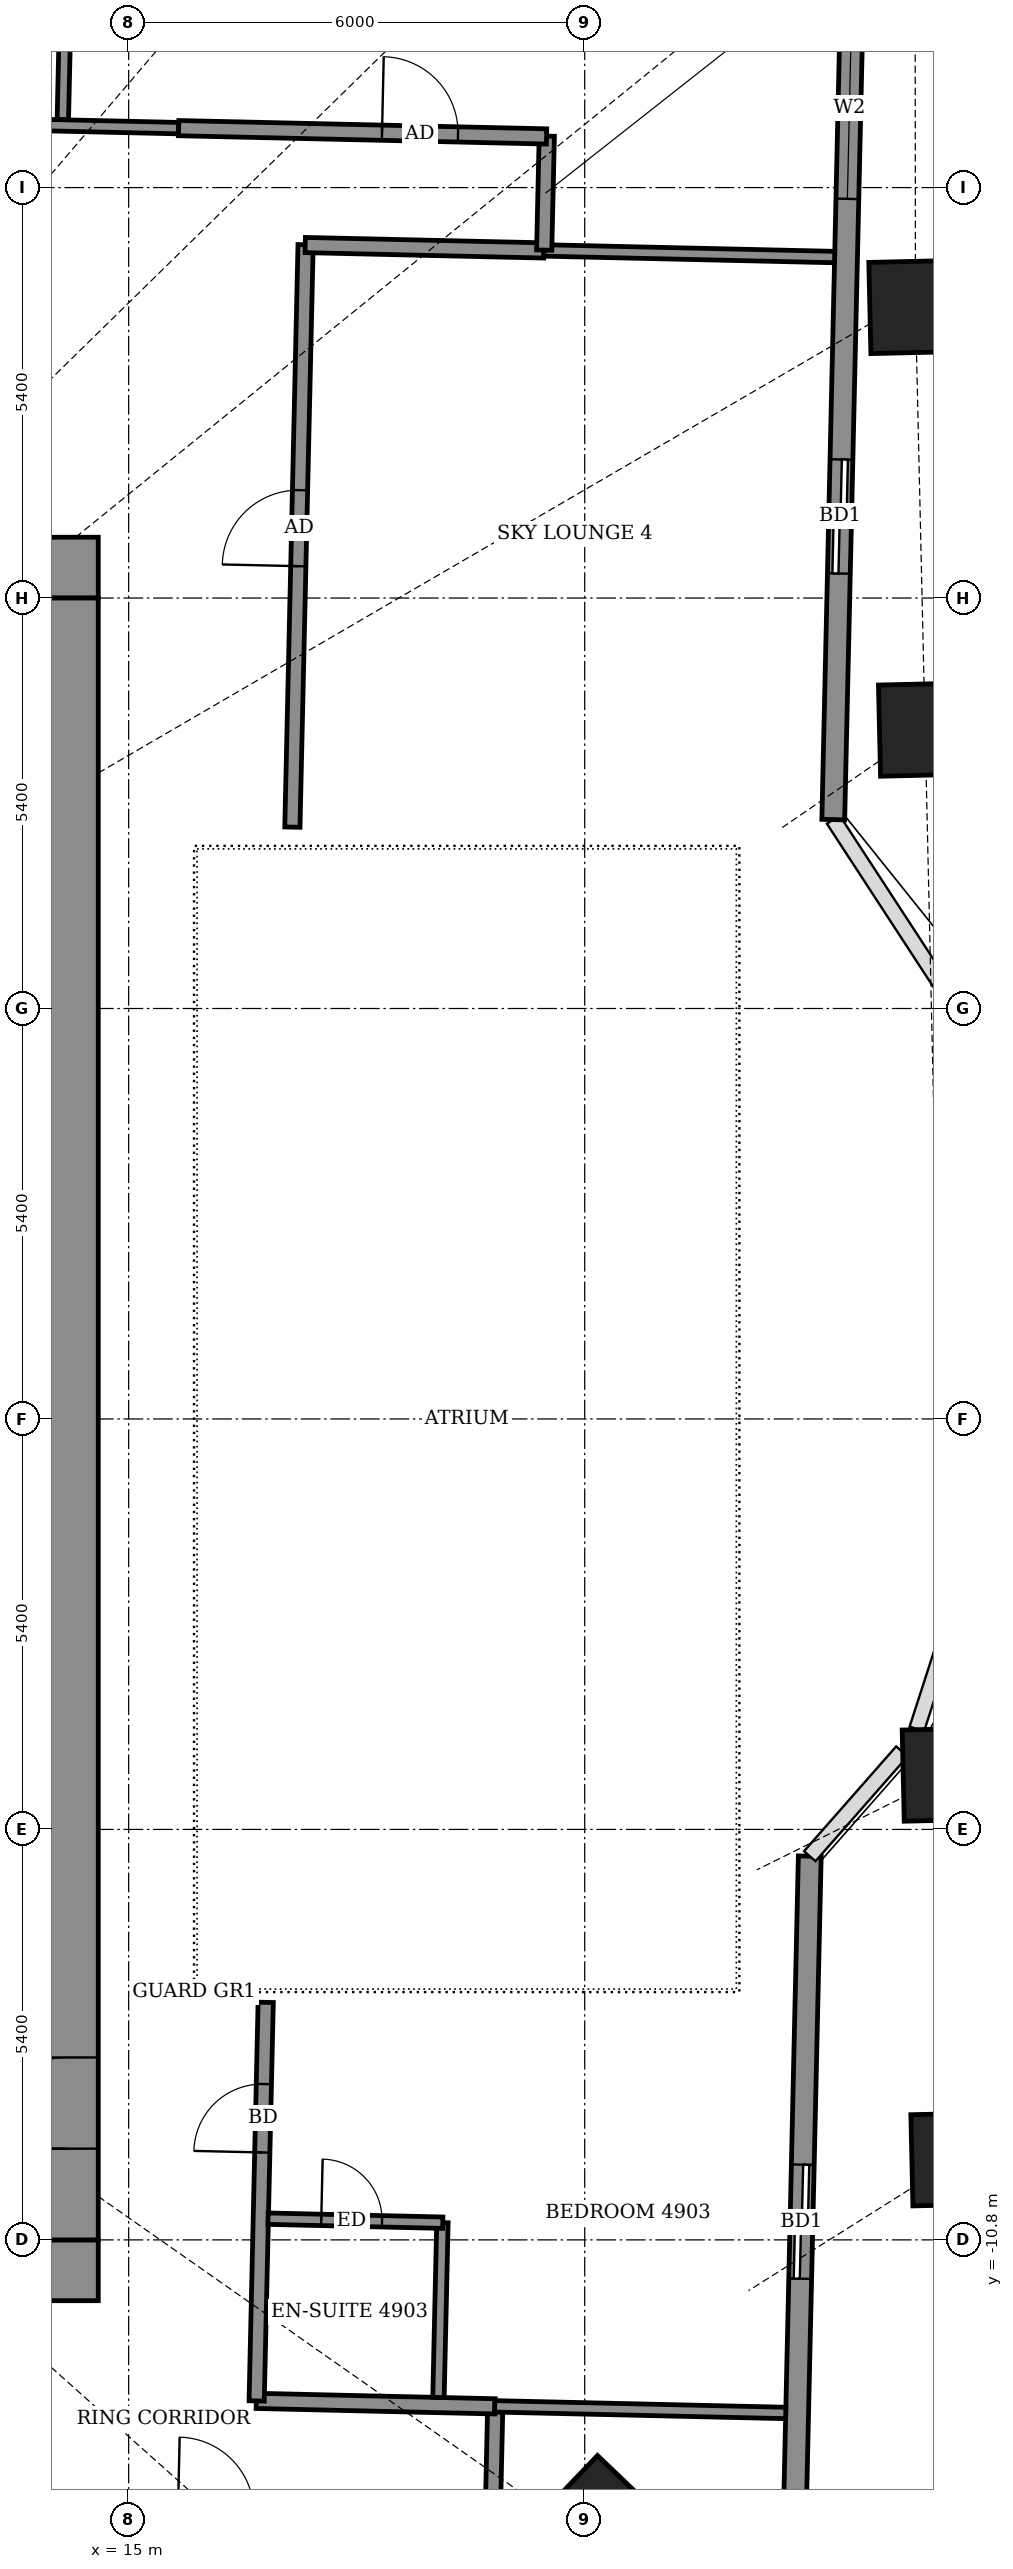
"""IFC4 building model, lengths in metres.
Left out: names, types, materials, properties, quantities, classifications, styles, units other than length and angle.
Written with IfcOpenShell. Run it as: python <this file> out.ifc"""

import sys

from ifc_helpers import new_model, si_unit, direction, frame, frame_2d, origin, origin_2d, place, context, subcontext, project, spatial, rectangle, extrude, element, fill, save


model = new_model("IFC4")
c1 = context("Model", 3, precision=1e-05, world=origin(), true_north=direction((0.0, 1.0)))
c2 = subcontext(c1, "Body", "Model", "MODEL_VIEW")
j1 = project(units=[si_unit("LENGTHUNIT", "METRE"), si_unit("PLANEANGLEUNIT", "RADIAN")], contexts=[c1])
p1 = place(None, origin())
s1 = spatial("IfcSite", under=j1, at=p1, CompositionType="ELEMENT")
p2 = place(p1, origin())
s2 = spatial("IfcBuilding", under=s1, at=p2, CompositionType="ELEMENT")
p3 = place(p2, frame((0.0, 0.0, 193.3)))
s3 = spatial("IfcBuildingStorey", under=s2, at=p3, CompositionType="ELEMENT", Elevation=193.3)
for number, where, z_axis, x_axis in (
    (1, (21.187, -14.486, -0.55), (0.0, 0.0, 1.0), (0.691, 0.723, 0.0)),
    (2, (26.183, -14.375, -0.55), (0.0, 0.0, 1.0), (0.686, 0.727, 0.0)),
    (3, (25.904, -9.74, -0.55), (0.0, 0.0, 1.0), (-0.023, 1.0, 0.0)),
    (4, (25.79, -4.678, -0.55), (0.0, 0.0, 1.0), (-0.023, 1.0, 0.0)),
    (5, (25.478, 9.069, -0.55), (0.0, 0.0, 1.0), (-0.023, 1.0, 0.0)),
    (6, (25.351, 14.629, -0.55), (0.0, 0.0, 1.0), (-0.023, 1.0, 0.0)),
):
    element("IfcColumn", number, at=place(p3, frame(where, z_axis=z_axis, x_axis=x_axis)), inside=s3, PredefinedType="COLUMN", context=c2, shape_type="SweptSolid", body=[
        extrude(rectangle(XDim=1.2, YDim=1.2, at=origin_2d()), origin(), (0.0, 0.0, 1.0), 4.6),
    ])
p4 = place(p3, frame((23.713, -16.679, 0.0), z_axis=(0.0, 0.0, 1.0), x_axis=(0.02269451316, 0.999742446369, 0.0)))
e7 = element("IfcWall", 7, at=p4, inside=s3, PredefinedType="SOLIDWALL", context=c2, shape_type="SweptSolid", body=[
    extrude(rectangle(XDim=10.93, YDim=0.3, at=frame_2d((5.465, 0.0))), origin(), (0.0, 0.0, 1.0), 2.65),
])
p5 = place(p4, frame((0.975, 0.0, 0.0)))
e8 = element("IfcOpeningElement", 8, at=p5, cuts=e7, PredefinedType="OPENING", context=c2, shape_type="SweptSolid", body=[
    extrude(rectangle(XDim=1.5, YDim=2.4, at=frame_2d((0.75, 1.2))), frame((0.0, 0.16, 0.0), z_axis=(0.0, -1.0, 0.0), x_axis=(1.0, 0.0, 0.0)), (0.0, 0.0, 1.0), 0.32),
])
p6 = place(p4, frame((5.37, 0.0, 0.0)))
e9 = element("IfcOpeningElement", 9, at=p6, cuts=e7, PredefinedType="OPENING", context=c2, shape_type="SweptSolid", body=[
    extrude(rectangle(XDim=1.5, YDim=2.4, at=frame_2d((0.75, 1.2))), frame((0.0, 0.16, 0.0), z_axis=(0.0, -1.0, 0.0), x_axis=(1.0, 0.0, 0.0)), (0.0, 0.0, 1.0), 0.32),
])
p7 = place(p3, frame((24.27, 7.885, 0.0), z_axis=(0.0, 0.0, 1.0), x_axis=(0.022715362207, 0.999741972871, 0.0)))
e10 = element("IfcWall", 10, at=p7, inside=s3, PredefinedType="SOLIDWALL", context=c2, shape_type="SweptSolid", body=[
    extrude(rectangle(XDim=11.93, YDim=0.3, at=frame_2d((5.965, 0.0))), origin(), (0.0, 0.0, 1.0), 2.65),
])
p8 = place(p7, frame((3.239, 0.0, 0.0)))
e11 = element("IfcOpeningElement", 11, at=p8, cuts=e10, PredefinedType="OPENING", context=c2, shape_type="SweptSolid", body=[
    extrude(rectangle(XDim=1.5, YDim=2.4, at=frame_2d((0.75, 1.2))), frame((0.0, 0.16, 0.0), z_axis=(0.0, -1.0, 0.0), x_axis=(1.0, 0.0, 0.0)), (0.0, 0.0, 1.0), 0.32),
])
p9 = place(p7, frame((8.169, 0.0, 0.9)))
e12 = element("IfcOpeningElement", 12, at=p9, cuts=e10, PredefinedType="OPENING", context=c2, shape_type="SweptSolid", body=[
    extrude(rectangle(XDim=2.4, YDim=1.5, at=frame_2d((1.2, 0.75))), frame((0.0, 0.16, 0.0), z_axis=(0.0, -1.0, 0.0), x_axis=(1.0, 0.0, 0.0)), (0.0, 0.0, 1.0), 0.32),
])
p10 = place(p3, frame((-17.718, -13.638, 0.0), z_axis=(0.0, 0.0, 1.0), x_axis=(0.999742614446, -0.022687107814, 0.0)))
e13 = element("IfcWall", 13, at=p10, inside=s3, PredefinedType="PARTITIONING", context=c2, shape_type="SweptSolid", body=[
    extrude(rectangle(XDim=37.514, YDim=0.2, at=frame_2d((18.757, 0.0))), origin(), (0.0, 0.0, 1.0), 2.85),
])
p11 = place(p10, frame((7.37, 0.0, 0.0)))
e14 = element("IfcOpeningElement", 14, at=p11, cuts=e13, PredefinedType="OPENING", context=c2, shape_type="SweptSolid", body=[
    extrude(rectangle(XDim=1.0, YDim=2.1, at=frame_2d((0.5, 1.05))), frame((0.0, 0.11, 0.0), z_axis=(0.0, -1.0, 0.0), x_axis=(1.0, 0.0, 0.0)), (0.0, 0.0, 1.0), 0.22),
])
p12 = place(p10, frame((3.295, 0.0, 0.0)))
e15 = element("IfcOpeningElement", 15, at=p12, cuts=e13, PredefinedType="OPENING", context=c2, shape_type="SweptSolid", body=[
    extrude(rectangle(XDim=0.9, YDim=2.1, at=frame_2d((0.45, 1.05))), frame((0.0, 0.11, 0.0), z_axis=(0.0, -1.0, 0.0), x_axis=(1.0, 0.0, 0.0)), (0.0, 0.0, 1.0), 0.22),
])
p13 = place(p10, frame((11.645, 0.0, 0.0)))
e16 = element("IfcOpeningElement", 16, at=p13, cuts=e13, PredefinedType="OPENING", context=c2, shape_type="SweptSolid", body=[
    extrude(rectangle(XDim=0.9, YDim=2.1, at=frame_2d((0.45, 1.05))), frame((0.0, 0.11, 0.0), z_axis=(0.0, -1.0, 0.0), x_axis=(1.0, 0.0, 0.0)), (0.0, 0.0, 1.0), 0.22),
])
p14 = place(p10, frame((19.02, 0.0, 0.0)))
e17 = element("IfcOpeningElement", 17, at=p14, cuts=e13, PredefinedType="OPENING", context=c2, shape_type="SweptSolid", body=[
    extrude(rectangle(XDim=0.9, YDim=2.1, at=frame_2d((0.45, 1.05))), frame((0.0, 0.11, 0.0), z_axis=(0.0, -1.0, 0.0), x_axis=(1.0, 0.0, 0.0)), (0.0, 0.0, 1.0), 0.22),
])
p15 = place(p10, frame((22.67, 0.0, 0.0)))
e18 = element("IfcOpeningElement", 18, at=p15, cuts=e13, PredefinedType="OPENING", context=c2, shape_type="SweptSolid", body=[
    extrude(rectangle(XDim=1.0, YDim=2.1, at=frame_2d((0.5, 1.05))), frame((0.0, 0.11, 0.0), z_axis=(0.0, -1.0, 0.0), x_axis=(1.0, 0.0, 0.0)), (0.0, 0.0, 1.0), 0.22),
])
p16 = place(p10, frame((26.445, 0.0, 0.0)))
e19 = element("IfcOpeningElement", 19, at=p16, cuts=e13, PredefinedType="OPENING", context=c2, shape_type="SweptSolid", body=[
    extrude(rectangle(XDim=0.9, YDim=2.1, at=frame_2d((0.45, 1.05))), frame((0.0, 0.11, 0.0), z_axis=(0.0, -1.0, 0.0), x_axis=(1.0, 0.0, 0.0)), (0.0, 0.0, 1.0), 0.22),
])
p17 = place(p10, frame((33.375, 0.0, 0.0)))
e20 = element("IfcOpeningElement", 20, at=p17, cuts=e13, PredefinedType="OPENING", context=c2, shape_type="SweptSolid", body=[
    extrude(rectangle(XDim=1.0, YDim=2.1, at=frame_2d((0.5, 1.05))), frame((0.0, 0.11, 0.0), z_axis=(0.0, -1.0, 0.0), x_axis=(1.0, 0.0, 0.0)), (0.0, 0.0, 1.0), 0.22),
])
p18 = place(p3, frame((19.789, -14.489, 0.0), z_axis=(0.0, 0.0, 1.0), x_axis=(0.022632637625, 0.99974384905, 0.0)))
e21 = element("IfcWall", 21, at=p18, inside=s3, PredefinedType="PARTITIONING", context=c2, shape_type="SweptSolid", body=[
    extrude(rectangle(XDim=1.5, YDim=0.2, at=frame_2d((0.75, 0.0))), origin(), (0.0, 0.0, 1.0), 2.85),
])
p19 = place(p3, frame((16.679, -12.918, 0.0), z_axis=(0.0, 0.0, 1.0), x_axis=(0.999737242123, -0.02292262447, 0.0)))
e22 = element("IfcWall", 22, at=p19, inside=s3, PredefinedType="PARTITIONING", context=c2, shape_type="SweptSolid", body=[
    extrude(rectangle(XDim=3.142, YDim=0.2, at=frame_2d((1.571, 0.0))), origin(), (0.0, 0.0, 1.0), 2.85),
])
p20 = place(p3, frame((16.684, -12.919, 0.0), z_axis=(0.0, 0.0, 1.0), x_axis=(0.022667483124, 0.999743059595, 0.0)))
e23 = element("IfcWall", 23, at=p20, inside=s3, PredefinedType="PARTITIONING", context=c2, shape_type="SweptSolid", body=[
    extrude(rectangle(XDim=5.245, YDim=0.2, at=frame_2d((2.623, 0.0))), origin(), (0.0, 0.0, 1.0), 2.85),
])
p21 = place(p20, frame((3.27, 0.0, 0.0)))
e24 = element("IfcOpeningElement", 24, at=p21, cuts=e23, PredefinedType="OPENING", context=c2, shape_type="SweptSolid", body=[
    extrude(rectangle(XDim=0.9, YDim=2.1, at=frame_2d((0.45, 1.05))), frame((0.0, 0.11, 0.0), z_axis=(0.0, -1.0, 0.0), x_axis=(1.0, 0.0, 0.0)), (0.0, 0.0, 1.0), 0.22),
])
p22 = place(p3, frame((19.076, -12.873, 0.0), z_axis=(0.0, 0.0, 1.0), x_axis=(0.022603288534, 0.999744513037, 0.0)))
e25 = element("IfcWall", 25, at=p22, inside=s3, PredefinedType="PARTITIONING", context=c2, shape_type="SweptSolid", body=[
    extrude(rectangle(XDim=2.301, YDim=0.15, at=frame_2d((1.15, 0.0))), origin(), (0.0, 0.0, 1.0), 2.85),
])
p23 = place(p3, frame((19.816, -12.99, 0.0), z_axis=(0.0, 0.0, 1.0), x_axis=(0.999742493286, -0.02269244629, 0.0)))
e26 = element("IfcWall", 26, at=p23, inside=s3, PredefinedType="PARTITIONING", context=c2, shape_type="SweptSolid", body=[
    extrude(rectangle(XDim=3.83, YDim=0.15, at=frame_2d((1.915, 0.0))), origin(), (0.0, 0.0, 1.0), 2.85),
])
p24 = place(p3, frame((16.834, -10.521, 0.0), z_axis=(0.0, 0.0, 1.0), x_axis=(0.999734605807, -0.023037316498, 0.0)))
e27 = element("IfcWall", 27, at=p24, inside=s3, PredefinedType="PARTITIONING", context=c2, shape_type="SweptSolid", body=[
    extrude(rectangle(XDim=2.3, YDim=0.15, at=frame_2d((1.15, 0.0))), origin(), (0.0, 0.0, 1.0), 4.05),
])
p25 = place(p24, frame((0.7, 0.0, 0.0)))
e28 = element("IfcOpeningElement", 28, at=p25, cuts=e27, PredefinedType="OPENING", context=c2, shape_type="SweptSolid", body=[
    extrude(rectangle(XDim=0.8, YDim=2.1, at=frame_2d((0.4, 1.05))), frame((0.0, 0.085, 0.0), z_axis=(0.0, -1.0, 0.0), x_axis=(1.0, 0.0, 0.0)), (0.0, 0.0, 1.0), 0.17),
])
p26 = place(p3, frame((17.154, 7.786, 0.0), z_axis=(0.0, 0.0, 1.0), x_axis=(0.022680883318, 0.999742755679, 0.0)))
e29 = element("IfcWall", 29, at=p26, inside=s3, PredefinedType="PARTITIONING", context=c2, shape_type="SweptSolid", body=[
    extrude(rectangle(XDim=7.664, YDim=0.2, at=frame_2d((3.832, 0.0))), origin(), (0.0, 0.0, 1.0), 2.75),
])
p27 = place(p26, frame((3.434, 0.0, 0.0)))
e30 = element("IfcOpeningElement", 30, at=p27, cuts=e29, PredefinedType="OPENING", context=c2, shape_type="SweptSolid", body=[
    extrude(rectangle(XDim=1.0, YDim=2.1, at=frame_2d((0.5, 1.05))), frame((0.0, 0.11, 0.0), z_axis=(0.0, -1.0, 0.0), x_axis=(1.0, 0.0, 0.0)), (0.0, 0.0, 1.0), 0.22),
])
p28 = place(p3, frame((17.323, 15.444, 0.0), z_axis=(0.0, 0.0, 1.0), x_axis=(0.999744316737, -0.022611969234, 0.0)))
e31 = element("IfcWall", 31, at=p28, inside=s3, PredefinedType="PARTITIONING", context=c2, shape_type="SweptSolid", body=[
    extrude(rectangle(XDim=3.142, YDim=0.2, at=frame_2d((1.571, 0.0))), origin(), (0.0, 0.0, 1.0), 2.85),
])
p29 = place(p3, frame((20.464, 15.373, 0.0), z_axis=(0.0, 0.0, 1.0), x_axis=(0.999740350573, -0.022786650396, 0.0)))
e32 = element("IfcWall", 32, at=p29, inside=s3, PredefinedType="PARTITIONING", context=c2, shape_type="SweptSolid", body=[
    extrude(rectangle(XDim=3.825, YDim=0.15, at=frame_2d((1.913, 0.0))), origin(), (0.0, 0.0, 1.0), 4.05),
])
p30 = place(p3, frame((20.467, 15.377, 0.0), z_axis=(0.0, 0.0, 1.0), x_axis=(0.022617910375, 0.999744182344, 0.0)))
e33 = element("IfcWall", 33, at=p30, inside=s3, PredefinedType="PARTITIONING", context=c2, shape_type="SweptSolid", body=[
    extrude(rectangle(XDim=1.5, YDim=0.2, at=frame_2d((0.75, 0.0))), origin(), (0.0, 0.0, 1.0), 2.85),
])
p31 = place(p3, frame((-14.871, 17.675, 0.0), z_axis=(0.0, 0.0, 1.0), x_axis=(0.999742359486, -0.02269834024, 0.0)))
e34 = element("IfcWall", 34, at=p31, inside=s3, PredefinedType="PARTITIONING", context=c2, shape_type="SweptSolid", body=[
    extrude(rectangle(XDim=30.536, YDim=0.15, at=frame_2d((15.268, 0.0))), origin(), (0.0, 0.0, 1.0), 2.55),
])
p32 = place(p31, frame((24.184, 0.0, 0.0)))
e35 = element("IfcOpeningElement", 35, at=p32, cuts=e34, PredefinedType="OPENING", context=c2, shape_type="SweptSolid", body=[
    extrude(rectangle(XDim=1.0, YDim=2.1, at=frame_2d((0.5, 1.05))), frame((0.0, 0.085, 0.0), z_axis=(0.0, -1.0, 0.0), x_axis=(1.0, 0.0, 0.0)), (0.0, 0.0, 1.0), 0.17),
])
p33 = place(p31, frame((27.359, 0.0, 0.0)))
e36 = element("IfcOpeningElement", 36, at=p33, cuts=e34, PredefinedType="OPENING", context=c2, shape_type="SweptSolid", body=[
    extrude(rectangle(XDim=0.9, YDim=2.1, at=frame_2d((0.45, 1.05))), frame((0.0, 0.085, 0.0), z_axis=(0.0, -1.0, 0.0), x_axis=(1.0, 0.0, 0.0)), (0.0, 0.0, 1.0), 0.17),
])
p34 = place(p31, frame((19.459, 0.0, 0.0)))
e37 = element("IfcOpeningElement", 37, at=p34, cuts=e34, PredefinedType="OPENING", context=c2, shape_type="SweptSolid", body=[
    extrude(rectangle(XDim=1.0, YDim=2.1, at=frame_2d((0.5, 1.05))), frame((0.0, 0.085, 0.0), z_axis=(0.0, -1.0, 0.0), x_axis=(1.0, 0.0, 0.0)), (0.0, 0.0, 1.0), 0.17),
])
p35 = place(p31, frame((15.509, 0.0, 0.0)))
e38 = element("IfcOpeningElement", 38, at=p35, cuts=e34, PredefinedType="OPENING", context=c2, shape_type="SweptSolid", body=[
    extrude(rectangle(XDim=0.9, YDim=2.1, at=frame_2d((0.45, 1.05))), frame((0.0, 0.085, 0.0), z_axis=(0.0, -1.0, 0.0), x_axis=(1.0, 0.0, 0.0)), (0.0, 0.0, 1.0), 0.17),
])
p36 = place(p31, frame((11.134, 0.0, 0.0)))
e39 = element("IfcOpeningElement", 39, at=p36, cuts=e34, PredefinedType="OPENING", context=c2, shape_type="SweptSolid", body=[
    extrude(rectangle(XDim=1.0, YDim=2.1, at=frame_2d((0.5, 1.05))), frame((0.0, 0.085, 0.0), z_axis=(0.0, -1.0, 0.0), x_axis=(1.0, 0.0, 0.0)), (0.0, 0.0, 1.0), 0.17),
])
p37 = place(p31, frame((5.209, 0.0, 0.0)))
e40 = element("IfcOpeningElement", 40, at=p37, cuts=e34, PredefinedType="OPENING", context=c2, shape_type="SweptSolid", body=[
    extrude(rectangle(XDim=1.0, YDim=2.1, at=frame_2d((0.5, 1.05))), frame((0.0, 0.085, 0.0), z_axis=(0.0, -1.0, 0.0), x_axis=(1.0, 0.0, 0.0)), (0.0, 0.0, 1.0), 0.17),
])
p38 = place(p31, frame((1.259, 0.0, 0.0)))
e41 = element("IfcOpeningElement", 41, at=p38, cuts=e34, PredefinedType="OPENING", context=c2, shape_type="SweptSolid", body=[
    extrude(rectangle(XDim=0.9, YDim=2.1, at=frame_2d((0.45, 1.05))), frame((0.0, 0.085, 0.0), z_axis=(0.0, -1.0, 0.0), x_axis=(1.0, 0.0, 0.0)), (0.0, 0.0, 1.0), 0.17),
])
p39 = place(p3, frame((15.658, 16.982, 0.0), z_axis=(0.0, 0.0, 1.0), x_axis=(0.999747041942, -0.022491156656, 0.0)))
e42 = element("IfcWall", 42, at=p39, inside=s3, PredefinedType="PARTITIONING", context=c2, shape_type="SweptSolid", body=[
    extrude(rectangle(XDim=4.841, YDim=0.2, at=frame_2d((2.421, 0.0))), origin(), (0.0, 0.0, 1.0), 2.75),
])
p40 = place(p39, frame((2.676, 0.0, 0.0)))
e43 = element("IfcOpeningElement", 43, at=p40, cuts=e42, PredefinedType="OPENING", context=c2, shape_type="SweptSolid", body=[
    extrude(rectangle(XDim=1.0, YDim=2.1, at=frame_2d((0.5, 1.05))), frame((0.0, 0.11, 0.0), z_axis=(0.0, -1.0, 0.0), x_axis=(1.0, 0.0, 0.0)), (0.0, 0.0, 1.0), 0.22),
])
p41 = place(p3, frame((14.134, 17.096, 0.0), z_axis=(0.0, 0.0, 1.0), x_axis=(0.022702393474, 0.999742267452, 0.0)))
e44 = element("IfcWall", 44, at=p41, inside=s3, PredefinedType="PARTITIONING", context=c2, shape_type="SweptSolid", body=[
    extrude(rectangle(XDim=7.001, YDim=0.15, at=frame_2d((3.5, 0.0))), origin(), (0.0, 0.0, 1.0), 2.55),
])
for number, where, z_axis, x_axis in (
    (45, (-14.6, -11.2, 0.0), (0.0, 0.0, 1.0), (1.0, 0.0, 0.0)),
    (46, (-14.6, 11.2, 0.0), (0.0, 0.0, 1.0), (1.0, 0.0, 0.0)),
):
    element("IfcWall", number, at=place(p3, frame(where, z_axis=z_axis, x_axis=x_axis)), inside=s3, PredefinedType="SHEAR", context=c2, shape_type="SweptSolid", body=[
        extrude(rectangle(XDim=29.2, YDim=0.8, at=frame_2d((14.6, 0.0))), origin(), (0.0, 0.0, 1.0), 4.6),
    ])
p42 = place(p3, frame((14.2, -10.8, 0.0), z_axis=(0.0, 0.0, 1.0), x_axis=(0.0, 1.0, 0.0)))
e47 = element("IfcWall", 47, at=p42, inside=s3, PredefinedType="SHEAR", context=c2, shape_type="SweptSolid", body=[
    extrude(rectangle(XDim=21.6, YDim=0.8, at=frame_2d((10.8, 0.0))), origin(), (0.0, 0.0, 1.0), 4.6),
])
p43 = place(p42, frame((1.2, 0.0, 0.0)))
e48 = element("IfcOpeningElement", 48, at=p43, cuts=e47, PredefinedType="OPENING", context=c2, shape_type="SweptSolid", body=[
    extrude(rectangle(XDim=1.2, YDim=2.1, at=frame_2d((0.6, 1.05))), frame((0.0, 0.41, 0.0), z_axis=(0.0, -1.0, 0.0), x_axis=(1.0, 0.0, 0.0)), (0.0, 0.0, 1.0), 0.82),
])
p44 = place(p6, origin())
e49 = element("IfcDoor", 49, at=p44, inside=s3, OperationType="SLIDING_TO_LEFT", PredefinedType="DOOR", context=c2, shape_type="SweptSolid", body=[
    extrude(rectangle(XDim=1.5, YDim=2.4, at=frame_2d((0.75, 1.2))), frame((0.0, 0.025, 0.0), z_axis=(0.0, -1.0, 0.0), x_axis=(1.0, 0.0, 0.0)), (0.0, 0.0, 1.0), 0.05),
])
fill(e9, e49)
p45 = place(p8, origin())
e50 = element("IfcDoor", 50, at=p45, inside=s3, OperationType="SLIDING_TO_LEFT", PredefinedType="DOOR", context=c2, shape_type="SweptSolid", body=[
    extrude(rectangle(XDim=1.5, YDim=2.4, at=frame_2d((0.75, 1.2))), frame((0.0, 0.025, 0.0), z_axis=(0.0, -1.0, 0.0), x_axis=(1.0, 0.0, 0.0)), (0.0, 0.0, 1.0), 0.05),
])
fill(e11, e50)
p46 = place(p9, origin())
e51 = element("IfcWindow", 51, at=p46, inside=s3, PartitioningType="DOUBLE_PANEL_VERTICAL", PredefinedType="WINDOW", context=c2, shape_type="SweptSolid", body=[
    extrude(rectangle(XDim=2.4, YDim=1.5, at=frame_2d((1.2, 0.75))), frame((0.0, 0.03, 0.0), z_axis=(0.0, -1.0, 0.0), x_axis=(1.0, 0.0, 0.0)), (0.0, 0.0, 1.0), 0.06),
])
fill(e12, e51)
p47 = place(p21, origin())
e52 = element("IfcDoor", 52, at=p47, inside=s3, OperationType="SINGLE_SWING_LEFT", PredefinedType="DOOR", context=c2, shape_type="SweptSolid", body=[
    extrude(rectangle(XDim=0.9, YDim=2.1, at=frame_2d((0.45, 1.05))), frame((0.0, 0.025, 0.0), z_axis=(0.0, -1.0, 0.0), x_axis=(1.0, 0.0, 0.0)), (0.0, 0.0, 1.0), 0.05),
])
fill(e24, e52)
p48 = place(p25, origin())
e53 = element("IfcDoor", 53, at=p48, inside=s3, OperationType="SINGLE_SWING_LEFT", PredefinedType="DOOR", context=c2, shape_type="SweptSolid", body=[
    extrude(rectangle(XDim=0.8, YDim=2.1, at=frame_2d((0.4, 1.05))), frame((0.0, 0.025, 0.0), z_axis=(0.0, -1.0, 0.0), x_axis=(1.0, 0.0, 0.0)), (0.0, 0.0, 1.0), 0.05),
])
fill(e28, e53)
p49 = place(p27, origin())
e54 = element("IfcDoor", 54, at=p49, inside=s3, OperationType="SINGLE_SWING_LEFT", PredefinedType="DOOR", context=c2, shape_type="SweptSolid", body=[
    extrude(rectangle(XDim=1.0, YDim=2.1, at=frame_2d((0.5, 1.05))), frame((0.0, 0.025, 0.0), z_axis=(0.0, -1.0, 0.0), x_axis=(1.0, 0.0, 0.0)), (0.0, 0.0, 1.0), 0.05),
])
fill(e30, e54)
p50 = place(p40, origin())
e55 = element("IfcDoor", 55, at=p50, inside=s3, OperationType="SINGLE_SWING_RIGHT", PredefinedType="DOOR", context=c2, shape_type="SweptSolid", body=[
    extrude(rectangle(XDim=1.0, YDim=2.1, at=frame_2d((0.5, 1.05))), frame((0.0, 0.025, 0.0), z_axis=(0.0, -1.0, 0.0), x_axis=(1.0, 0.0, 0.0)), (0.0, 0.0, 1.0), 0.05),
])
fill(e43, e55)
p51 = place(p43, origin())
e56 = element("IfcDoor", 56, at=p51, inside=s3, OperationType="DOUBLE_DOOR_SINGLE_SWING", PredefinedType="DOOR", context=c2, shape_type="SweptSolid", body=[
    extrude(rectangle(XDim=1.2, YDim=2.1, at=frame_2d((0.6, 1.05))), frame((0.0, 0.025, 0.0), z_axis=(0.0, -1.0, 0.0), x_axis=(1.0, 0.0, 0.0)), (0.0, 0.0, 1.0), 0.05),
])
fill(e48, e56)
save(model, sys.argv[1])
